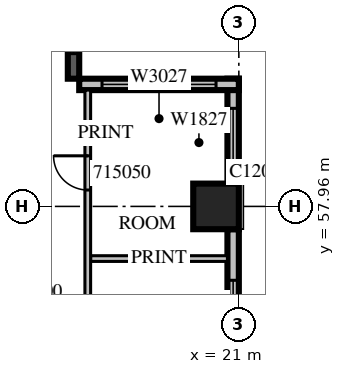
"""IFC4 building model, lengths in metres.
Left out: names, types, materials, properties, quantities, classifications, styles, units other than length and angle.
Written with IfcOpenShell. Run it as: python <this file> out.ifc"""

import sys

from ifc_helpers import new_model, si_unit, direction, frame, frame_2d, origin, origin_2d, place, context, subcontext, project, spatial, rectangle, extrude, source, transform, mapped, element, fill, save


model = new_model("IFC4")
c1 = context("Model", 3, precision=1e-05, world=origin(), true_north=direction((0.0, 1.0)))
c2 = subcontext(c1, "Body", "Model", "MODEL_VIEW")
j1 = project(units=[si_unit("LENGTHUNIT", "METRE"), si_unit("PLANEANGLEUNIT", "RADIAN")], contexts=[c1])
p1 = place(None, origin())
s1 = spatial("IfcSite", under=j1, at=p1, CompositionType="ELEMENT")
p2 = place(p1, origin())
s2 = spatial("IfcBuilding", under=s1, at=p2, CompositionType="ELEMENT")
p3 = place(p2, frame((0.0, 0.0, 74.1)))
s3 = spatial("IfcBuildingStorey", under=s2, at=p3, CompositionType="ELEMENT", Elevation=74.1)
m1 = source(origin(), c2, "Body", "SweptSolid", [
    extrude(rectangle(XDim=1.2, YDim=1.2, at=origin_2d()), origin(), (0.0, 0.0, 1.0), 4.2),
])
p4 = place(p3, frame((20.4, 57.96, 0.0), z_axis=(0.0, 0.0, 1.0), x_axis=(1.0, 0.0, 0.0)))
e1 = element("IfcColumn", 1, at=p4, inside=s3, PredefinedType="COLUMN", context=c2, shape_type="MappedRepresentation", body=[
    mapped(m1, transform((0.0, 0.0, 0.0), scale=1.0)),
])
m2 = source(origin(), c2, "Body", "SweptSolid", [
    extrude(rectangle(XDim=4.68, YDim=0.3, at=frame_2d((2.34, 0.0))), origin(), (0.0, 0.0, 1.0), 3.8),
])
p5 = place(p3, frame((20.85, 52.68, 0.0), z_axis=(0.0, 0.0, 1.0), x_axis=(0.0, 1.0, 0.0)))
e2 = element("IfcWall", 2, at=p5, inside=s3, PredefinedType="STANDARD", context=c2, shape_type="MappedRepresentation", body=[
    mapped(m2, transform((0.0, 0.0, 0.0), scale=1.0)),
])
m3 = source(origin(), c2, "Body", "SweptSolid", [
    extrude(rectangle(XDim=2.4, YDim=2.7, at=frame_2d((1.2, 1.35))), frame((0.0, 0.16, 0.0), z_axis=(0.0, -1.0, 0.0), x_axis=(1.0, 0.0, 0.0)), (0.0, 0.0, 1.0), 0.32),
])
p6 = place(p5, frame((0.936, 0.0, 0.6)))
e3 = element("IfcOpeningElement", 3, at=p6, cuts=e2, PredefinedType="OPENING", context=c2, shape_type="MappedRepresentation", body=[
    mapped(m3, transform((0.0, 0.0, 0.0), scale=1.0)),
])
m4 = source(origin(), c2, "Body", "SweptSolid", [
    extrude(rectangle(XDim=2.76, YDim=0.3, at=frame_2d((1.38, 0.0))), origin(), (0.0, 0.0, 1.0), 3.8),
])
p7 = place(p3, frame((20.85, 58.56, 0.0), z_axis=(0.0, 0.0, 1.0), x_axis=(0.0, 1.0, 0.0)))
e4 = element("IfcWall", 4, at=p7, inside=s3, PredefinedType="STANDARD", context=c2, shape_type="MappedRepresentation", body=[
    mapped(m4, transform((0.0, 0.0, 0.0), scale=1.0)),
])
m5 = source(origin(), c2, "Body", "SweptSolid", [
    extrude(rectangle(XDim=1.8, YDim=2.7, at=frame_2d((0.9, 1.35))), frame((0.0, 0.16, 0.0), z_axis=(0.0, -1.0, 0.0), x_axis=(1.0, 0.0, 0.0)), (0.0, 0.0, 1.0), 0.32),
])
p8 = place(p7, frame((0.18, 0.0, 0.6)))
e5 = element("IfcOpeningElement", 5, at=p8, cuts=e4, PredefinedType="OPENING", context=c2, shape_type="MappedRepresentation", body=[
    mapped(m5, transform((0.0, 0.0, 0.0), scale=1.0)),
])
m6 = source(origin(), c2, "Body", "SweptSolid", [
    extrude(rectangle(XDim=4.2, YDim=0.3, at=frame_2d((2.1, 0.0))), origin(), (0.0, 0.0, 1.0), 3.8),
])
p9 = place(p3, frame((21.0, 61.17, 0.0), z_axis=(0.0, 0.0, 1.0), x_axis=(-1.0, 0.0, 0.0)))
e6 = element("IfcWall", 6, at=p9, inside=s3, PredefinedType="STANDARD", context=c2, shape_type="MappedRepresentation", body=[
    mapped(m6, transform((0.0, 0.0, 0.0), scale=1.0)),
])
m7 = source(origin(), c2, "Body", "SweptSolid", [
    extrude(rectangle(XDim=3.0, YDim=2.7, at=frame_2d((1.5, 1.35))), frame((0.0, 0.16, 0.0), z_axis=(0.0, -1.0, 0.0), x_axis=(1.0, 0.0, 0.0)), (0.0, 0.0, 1.0), 0.32),
])
p10 = place(p9, frame((0.6, 0.0, 0.6)))
e7 = element("IfcOpeningElement", 7, at=p10, cuts=e6, PredefinedType="OPENING", context=c2, shape_type="MappedRepresentation", body=[
    mapped(m7, transform((0.0, 0.0, 0.0), scale=1.0)),
])
p11 = place(p3, frame((16.65, 61.32, 0.0), z_axis=(0.0, 0.0, 1.0), x_axis=(0.0, 1.0, 0.0)))
e8 = element("IfcWall", 8, at=p11, inside=s3, PredefinedType="SOLIDWALL", context=c2, shape_type="SweptSolid", body=[
    extrude(rectangle(XDim=2.52, YDim=0.3, at=frame_2d((1.26, 0.0))), origin(), (0.0, 0.0, 1.0), 3.8),
])
m8 = source(origin(), c2, "Body", "SweptSolid", [
    extrude(rectangle(XDim=1.2, YDim=2.7, at=frame_2d((0.6, 1.35))), frame((0.0, 0.16, 0.0), z_axis=(0.0, -1.0, 0.0), x_axis=(1.0, 0.0, 0.0)), (0.0, 0.0, 1.0), 0.32),
])
p12 = place(p11, frame((0.66, 0.0, 0.6)))
e9 = element("IfcOpeningElement", 9, at=p12, cuts=e8, PredefinedType="OPENING", context=c2, shape_type="MappedRepresentation", body=[
    mapped(m8, transform((0.0, 0.0, 0.0), scale=1.0)),
])
m9 = source(origin(), c2, "Body", "SweptSolid", [
    extrude(rectangle(XDim=3.6, YDim=0.15, at=frame_2d((1.8, 0.0))), origin(), (0.0, 0.0, 1.0), 3.8),
])
p13 = place(p3, frame((17.1, 56.587, 0.0), z_axis=(0.0, 0.0, 1.0), x_axis=(1.0, 0.0, 0.0)))
e10 = element("IfcWall", 10, at=p13, inside=s3, PredefinedType="PARTITIONING", context=c2, shape_type="MappedRepresentation", body=[
    mapped(m9, transform((0.0, 0.0, 0.0), scale=1.0)),
])
m10 = source(origin(), c2, "Body", "SweptSolid", [
    extrude(rectangle(XDim=31.62, YDim=0.15, at=frame_2d((15.81, 0.0))), origin(), (0.0, 0.0, 1.0), 3.3),
])
p14 = place(p3, frame((17.025, 61.02, 0.0), z_axis=(0.0, 0.0, 1.0), x_axis=(0.0, -1.0, 0.0)))
e11 = element("IfcWall", 11, at=p14, inside=s3, PredefinedType="PARTITIONING", context=c2, shape_type="MappedRepresentation", body=[
    mapped(m10, transform((0.0, 0.0, 0.0), scale=1.0)),
])
m11 = source(origin(), c2, "Body", "SweptSolid", [
    extrude(rectangle(XDim=1.0, YDim=2.1, at=frame_2d((0.5, 1.05))), frame((0.0, 0.085, 0.0), z_axis=(0.0, -1.0, 0.0), x_axis=(1.0, 0.0, 0.0)), (0.0, 0.0, 1.0), 0.17),
])
p15 = place(p14, frame((29.263, 0.0, 0.0)))
e12 = element("IfcOpeningElement", 12, at=p15, cuts=e11, PredefinedType="OPENING", context=c2, shape_type="MappedRepresentation", body=[
    mapped(m11, transform((0.0, 0.0, 0.0), scale=1.0)),
])
p16 = place(p14, frame((25.951, 0.0, 0.0)))
e13 = element("IfcOpeningElement", 13, at=p16, cuts=e11, PredefinedType="OPENING", context=c2, shape_type="MappedRepresentation", body=[
    mapped(m11, transform((0.0, 0.0, 0.0), scale=1.0)),
])
p17 = place(p14, frame((23.608, 0.0, 0.0)))
e14 = element("IfcOpeningElement", 14, at=p17, cuts=e11, PredefinedType="OPENING", context=c2, shape_type="MappedRepresentation", body=[
    mapped(m11, transform((0.0, 0.0, 0.0), scale=1.0)),
])
m12 = source(origin(), c2, "Body", "SweptSolid", [
    extrude(rectangle(XDim=0.9, YDim=2.1, at=frame_2d((0.45, 1.05))), frame((0.0, 0.085, 0.0), z_axis=(0.0, -1.0, 0.0), x_axis=(1.0, 0.0, 0.0)), (0.0, 0.0, 1.0), 0.17),
])
p18 = place(p14, frame((20.67, 0.0, 0.0)))
e15 = element("IfcOpeningElement", 15, at=p18, cuts=e11, PredefinedType="OPENING", context=c2, shape_type="MappedRepresentation", body=[
    mapped(m12, transform((0.0, 0.0, 0.0), scale=1.0)),
])
p19 = place(p14, frame((16.47, 0.0, 0.0)))
e16 = element("IfcOpeningElement", 16, at=p19, cuts=e11, PredefinedType="OPENING", context=c2, shape_type="MappedRepresentation", body=[
    mapped(m12, transform((0.0, 0.0, 0.0), scale=1.0)),
])
p20 = place(p14, frame((12.677, 0.0, 0.0)))
e17 = element("IfcOpeningElement", 17, at=p20, cuts=e11, PredefinedType="OPENING", context=c2, shape_type="MappedRepresentation", body=[
    mapped(m12, transform((0.0, 0.0, 0.0), scale=1.0)),
])
p21 = place(p14, frame((9.737, 0.0, 0.0)))
e18 = element("IfcOpeningElement", 18, at=p21, cuts=e11, PredefinedType="OPENING", context=c2, shape_type="MappedRepresentation", body=[
    mapped(m12, transform((0.0, 0.0, 0.0), scale=1.0)),
])
p22 = place(p14, frame((6.236, 0.0, 0.0)))
e19 = element("IfcOpeningElement", 19, at=p22, cuts=e11, PredefinedType="OPENING", context=c2, shape_type="MappedRepresentation", body=[
    mapped(m12, transform((0.0, 0.0, 0.0), scale=1.0)),
])
p23 = place(p14, frame((1.729, 0.0, 0.0)))
e20 = element("IfcOpeningElement", 20, at=p23, cuts=e11, PredefinedType="OPENING", context=c2, shape_type="MappedRepresentation", body=[
    mapped(m12, transform((0.0, 0.0, 0.0), scale=1.0)),
])
m13 = source(origin(), c2, "Body", "SweptSolid", [
    extrude(rectangle(XDim=2.4, YDim=2.7, at=frame_2d((1.2, 1.35))), frame((0.0, 0.03, 0.0), z_axis=(0.0, -1.0, 0.0), x_axis=(1.0, 0.0, 0.0)), (0.0, 0.0, 1.0), 0.06),
])
p24 = place(p6, origin())
e21 = element("IfcWindow", 21, at=p24, inside=s3, PartitioningType="SINGLE_PANEL", PredefinedType="WINDOW", context=c2, shape_type="MappedRepresentation", body=[
    mapped(m13, transform((0.0, 0.0, 0.0), scale=1.0)),
])
fill(e3, e21)
m14 = source(origin(), c2, "Body", "SweptSolid", [
    extrude(rectangle(XDim=1.8, YDim=2.7, at=frame_2d((0.9, 1.35))), frame((0.0, 0.03, 0.0), z_axis=(0.0, -1.0, 0.0), x_axis=(1.0, 0.0, 0.0)), (0.0, 0.0, 1.0), 0.06),
])
p25 = place(p8, origin())
e22 = element("IfcWindow", 22, at=p25, inside=s3, PartitioningType="SINGLE_PANEL", PredefinedType="WINDOW", context=c2, shape_type="MappedRepresentation", body=[
    mapped(m14, transform((0.0, 0.0, 0.0), scale=1.0)),
])
fill(e5, e22)
m15 = source(origin(), c2, "Body", "SweptSolid", [
    extrude(rectangle(XDim=3.0, YDim=2.7, at=frame_2d((1.5, 1.35))), frame((0.0, 0.03, 0.0), z_axis=(0.0, -1.0, 0.0), x_axis=(1.0, 0.0, 0.0)), (0.0, 0.0, 1.0), 0.06),
])
p26 = place(p10, origin())
e23 = element("IfcWindow", 23, at=p26, inside=s3, PartitioningType="SINGLE_PANEL", PredefinedType="WINDOW", context=c2, shape_type="MappedRepresentation", body=[
    mapped(m15, transform((0.0, 0.0, 0.0), scale=1.0)),
])
fill(e7, e23)
m16 = source(origin(), c2, "Body", "SweptSolid", [
    extrude(rectangle(XDim=1.2, YDim=2.7, at=frame_2d((0.6, 1.35))), frame((0.0, 0.03, 0.0), z_axis=(0.0, -1.0, 0.0), x_axis=(1.0, 0.0, 0.0)), (0.0, 0.0, 1.0), 0.06),
])
p27 = place(p12, origin())
e24 = element("IfcWindow", 24, at=p27, inside=s3, PartitioningType="SINGLE_PANEL", PredefinedType="WINDOW", context=c2, shape_type="MappedRepresentation", body=[
    mapped(m16, transform((0.0, 0.0, 0.0), scale=1.0)),
])
fill(e9, e24)
m17 = source(origin(), c2, "Body", "SweptSolid", [
    extrude(rectangle(XDim=0.9, YDim=2.1, at=frame_2d((0.45, 1.05))), frame((0.0, 0.025, 0.0), z_axis=(0.0, -1.0, 0.0), x_axis=(1.0, 0.0, 0.0)), (0.0, 0.0, 1.0), 0.05),
])
p28 = place(p23, origin())
e25 = element("IfcDoor", 25, at=p28, inside=s3, OperationType="SINGLE_SWING_RIGHT", PredefinedType="DOOR", context=c2, shape_type="MappedRepresentation", body=[
    mapped(m17, transform((0.0, 0.0, 0.0), scale=1.0)),
])
fill(e20, e25)
save(model, sys.argv[1])
